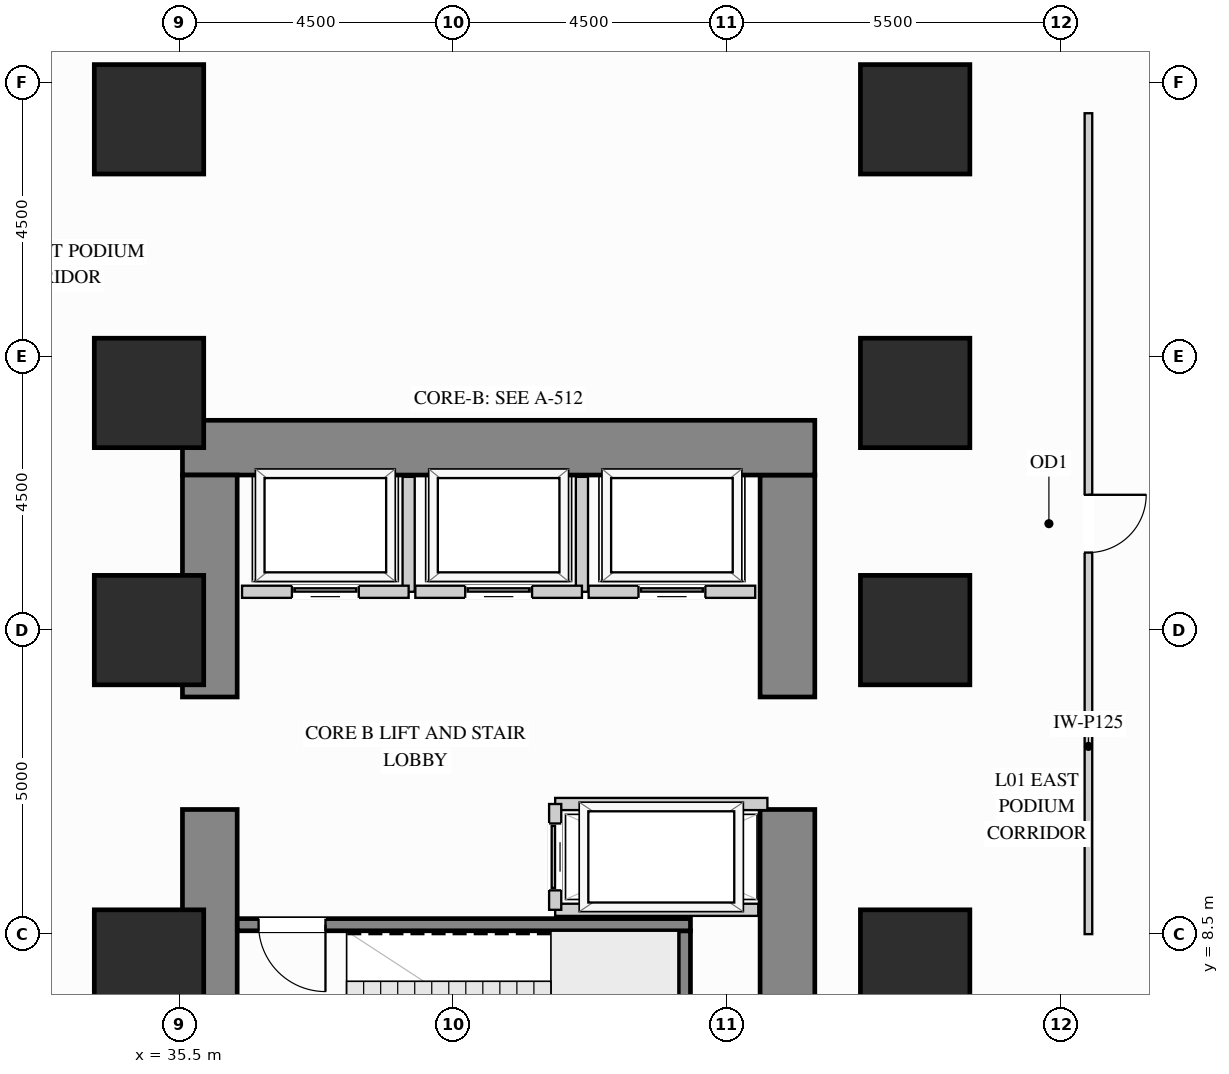
"""IFC4 building model, lengths in metres.
Left out: names, types, materials, properties, quantities, classifications, styles, units other than length and angle.
Written with IfcOpenShell. Run it as: python <this file> out.ifc"""

import sys

from ifc_helpers import new_model, si_unit, direction, frame, frame_2d, origin, origin_2d, place, context, subcontext, project, spatial, rectangle, extrude, source, transform, mapped, element, fill, save


model = new_model("IFC4")
c1 = context("Model", 3, precision=1e-05, world=origin(), true_north=direction((0.0, 1.0)))
c2 = subcontext(c1, "Body", "Model", "MODEL_VIEW")
j1 = project(units=[si_unit("LENGTHUNIT", "METRE"), si_unit("PLANEANGLEUNIT", "RADIAN")], contexts=[c1])
p1 = place(None, origin())
s1 = spatial("IfcSite", under=j1, at=p1, CompositionType="ELEMENT")
p2 = place(p1, origin())
s2 = spatial("IfcBuilding", under=s1, at=p2, CompositionType="ELEMENT")
p3 = place(p2, frame((0.0, 0.0, 4.5)))
s3 = spatial("IfcBuildingStorey", under=s2, at=p3, CompositionType="ELEMENT", Elevation=4.5)
m1 = source(origin(), c2, "Body", "SweptSolid", [
    extrude(rectangle(XDim=1.8, YDim=1.8, at=origin_2d()), origin(), (0.0, 0.0, 1.0), 4.25),
])
for number, where, z_axis, x_axis in (
    (1, (47.6, 8.0, 0.0), (0.0, 0.0, 1.0), (1.0, 0.0, 0.0)),
    (2, (47.6, 13.5, 0.0), (0.0, 0.0, 1.0), (1.0, 0.0, 0.0)),
    (3, (47.6, 17.4, 0.0), (0.0, 0.0, 1.0), (1.0, 0.0, 0.0)),
    (4, (47.6, 21.9, 0.0), (0.0, 0.0, 1.0), (1.0, 0.0, 0.0)),
    (5, (35.0, 8.0, 0.0), (0.0, 0.0, 1.0), (1.0, 0.0, 0.0)),
    (6, (35.0, 13.5, 0.0), (0.0, 0.0, 1.0), (1.0, 0.0, 0.0)),
    (7, (35.0, 17.4, 0.0), (0.0, 0.0, 1.0), (1.0, 0.0, 0.0)),
    (8, (35.0, 21.9, 0.0), (0.0, 0.0, 1.0), (1.0, 0.0, 0.0)),
):
    element("IfcColumn", number, at=place(p3, frame(where, z_axis=z_axis, x_axis=x_axis)), inside=s3, PredefinedType="COLUMN", context=c2, shape_type="MappedRepresentation", body=[
        mapped(m1, transform((0.0, 0.0, 0.0), x_axis=(1.0, 0.0, 0.0), y_axis=(0.0, 1.0, 0.0), z_axis=(0.0, 0.0, 1.0))),
    ])
m2 = source(origin(), c2, "Body", "SweptSolid", [
    extrude(rectangle(XDim=5.6, YDim=0.9, at=frame_2d((2.8, 0.0))), origin(), (0.0, 0.0, 1.0), 4.25),
])
p4 = place(p3, frame((45.5, 4.95, 0.0), z_axis=(0.0, 0.0, 1.0), x_axis=(0.0, 1.0, 0.0)))
e9 = element("IfcWall", 9, at=p4, inside=s3, PredefinedType="SHEAR", context=c2, shape_type="MappedRepresentation", body=[
    mapped(m2, transform((0.0, 0.0, 0.0), x_axis=(1.0, 0.0, 0.0), y_axis=(0.0, 1.0, 0.0), z_axis=(0.0, 0.0, 1.0))),
])
m3 = source(origin(), c2, "Body", "SweptSolid", [
    extrude(rectangle(XDim=3.65, YDim=0.9, at=frame_2d((1.825, 0.0))), origin(), (0.0, 0.0, 1.0), 4.25),
])
p5 = place(p3, frame((45.5, 12.4, 0.0), z_axis=(0.0, 0.0, 1.0), x_axis=(0.0, 1.0, 0.0)))
e10 = element("IfcWall", 10, at=p5, inside=s3, PredefinedType="SHEAR", context=c2, shape_type="MappedRepresentation", body=[
    mapped(m3, transform((0.0, 0.0, 0.0), x_axis=(1.0, 0.0, 0.0), y_axis=(0.0, 1.0, 0.0), z_axis=(0.0, 0.0, 1.0))),
])
m4 = source(origin(), c2, "Body", "SweptSolid", [
    extrude(rectangle(XDim=10.4, YDim=0.9, at=frame_2d((5.2, 0.0))), origin(), (0.0, 0.0, 1.0), 4.25),
])
p6 = place(p3, frame((35.55, 16.5, 0.0), z_axis=(0.0, 0.0, 1.0), x_axis=(1.0, 0.0, 0.0)))
e11 = element("IfcWall", 11, at=p6, inside=s3, PredefinedType="SHEAR", context=c2, shape_type="MappedRepresentation", body=[
    mapped(m4, transform((0.0, 0.0, 0.0), x_axis=(1.0, 0.0, 0.0), y_axis=(0.0, 1.0, 0.0), z_axis=(0.0, 0.0, 1.0))),
])
p7 = place(p3, frame((36.0, 4.95, 0.0), z_axis=(0.0, 0.0, 1.0), x_axis=(0.0, 1.0, 0.0)))
e12 = element("IfcWall", 12, at=p7, inside=s3, PredefinedType="SHEAR", context=c2, shape_type="MappedRepresentation", body=[
    mapped(m2, transform((0.0, 0.0, 0.0), x_axis=(1.0, 0.0, 0.0), y_axis=(0.0, 1.0, 0.0), z_axis=(0.0, 0.0, 1.0))),
])
p8 = place(p3, frame((36.0, 12.4, 0.0), z_axis=(0.0, 0.0, 1.0), x_axis=(0.0, 1.0, 0.0)))
e13 = element("IfcWall", 13, at=p8, inside=s3, PredefinedType="SHEAR", context=c2, shape_type="MappedRepresentation", body=[
    mapped(m3, transform((0.0, 0.0, 0.0), x_axis=(1.0, 0.0, 0.0), y_axis=(0.0, 1.0, 0.0), z_axis=(0.0, 0.0, 1.0))),
])
p9 = place(p3, frame((50.45, 8.5, 0.0), z_axis=(0.0, 0.0, 1.0), x_axis=(0.0, 1.0, 0.0)))
e14 = element("IfcWall", 14, at=p9, inside=s3, PredefinedType="PARTITIONING", context=c2, shape_type="SweptSolid", body=[
    extrude(rectangle(XDim=13.5, YDim=0.125, at=frame_2d((6.75, 0.0))), origin(), (0.0, 0.0, 1.0), 4.235),
])
p10 = place(p9, frame((6.275, 0.0, 0.0)))
e15 = element("IfcOpeningElement", 15, at=p10, cuts=e14, PredefinedType="OPENING", context=c2, shape_type="SweptSolid", body=[
    extrude(rectangle(XDim=0.95, YDim=2.15, at=frame_2d((0.475, 1.075))), frame((0.0, 0.073, 0.0), z_axis=(0.0, -1.0, 0.0), x_axis=(1.0, 0.0, 0.0)), (0.0, 0.0, 1.0), 0.145),
])
m5 = source(origin(), c2, "Body", "SweptSolid", [
    extrude(rectangle(XDim=1.89, YDim=0.2, at=frame_2d((0.945, 0.0))), origin(), (0.0, 0.0, 1.0), 4.235),
])
p11 = place(p3, frame((39.27, 14.13, 0.0), z_axis=(0.0, 0.0, 1.0), x_axis=(0.0, 1.0, 0.0)))
e16 = element("IfcWall", 16, at=p11, inside=s3, PredefinedType="PARTITIONING", context=c2, shape_type="MappedRepresentation", body=[
    mapped(m5, transform((0.0, 0.0, 0.0), x_axis=(1.0, 0.0, 0.0), y_axis=(0.0, 1.0, 0.0), z_axis=(0.0, 0.0, 1.0))),
])
p12 = place(p3, frame((36.53, 14.13, 0.0), z_axis=(0.0, 0.0, 1.0), x_axis=(1.0, 0.0, 0.0)))
e17 = element("IfcWall", 17, at=p12, inside=s3, PredefinedType="PARTITIONING", context=c2, shape_type="SweptSolid", body=[
    extrude(rectangle(XDim=2.74, YDim=0.2, at=frame_2d((1.37, 0.0))), origin(), (0.0, 0.0, 1.0), 4.235),
])
p13 = place(p12, frame((0.82, 0.0, 0.0)))
e18 = element("IfcOpeningElement", 18, at=p13, cuts=e17, PredefinedType="OPENING", context=c2, shape_type="SweptSolid", body=[
    extrude(rectangle(XDim=1.1, YDim=2.2, at=frame_2d((0.55, 1.1))), frame((0.0, 0.11, 0.0), z_axis=(0.0, -1.0, 0.0), x_axis=(1.0, 0.0, 0.0)), (0.0, 0.0, 1.0), 0.22),
])
p14 = place(p3, frame((42.12, 14.13, 0.0), z_axis=(0.0, 0.0, 1.0), x_axis=(0.0, 1.0, 0.0)))
e19 = element("IfcWall", 19, at=p14, inside=s3, PredefinedType="PARTITIONING", context=c2, shape_type="MappedRepresentation", body=[
    mapped(m5, transform((0.0, 0.0, 0.0), x_axis=(1.0, 0.0, 0.0), y_axis=(0.0, 1.0, 0.0), z_axis=(0.0, 0.0, 1.0))),
])
p15 = place(p3, frame((39.38, 14.13, 0.0), z_axis=(0.0, 0.0, 1.0), x_axis=(1.0, 0.0, 0.0)))
e20 = element("IfcWall", 20, at=p15, inside=s3, PredefinedType="PARTITIONING", context=c2, shape_type="SweptSolid", body=[
    extrude(rectangle(XDim=2.74, YDim=0.2, at=frame_2d((1.37, 0.0))), origin(), (0.0, 0.0, 1.0), 4.235),
])
p16 = place(p15, frame((0.82, 0.0, 0.0)))
e21 = element("IfcOpeningElement", 21, at=p16, cuts=e20, PredefinedType="OPENING", context=c2, shape_type="SweptSolid", body=[
    extrude(rectangle(XDim=1.1, YDim=2.2, at=frame_2d((0.55, 1.1))), frame((0.0, 0.11, 0.0), z_axis=(0.0, -1.0, 0.0), x_axis=(1.0, 0.0, 0.0)), (0.0, 0.0, 1.0), 0.22),
])
p17 = place(p3, frame((42.23, 14.13, 0.0), z_axis=(0.0, 0.0, 1.0), x_axis=(1.0, 0.0, 0.0)))
e22 = element("IfcWall", 22, at=p17, inside=s3, PredefinedType="PARTITIONING", context=c2, shape_type="SweptSolid", body=[
    extrude(rectangle(XDim=2.74, YDim=0.2, at=frame_2d((1.37, 0.0))), origin(), (0.0, 0.0, 1.0), 4.235),
])
p18 = place(p17, frame((0.82, 0.0, 0.0)))
e23 = element("IfcOpeningElement", 23, at=p18, cuts=e22, PredefinedType="OPENING", context=c2, shape_type="SweptSolid", body=[
    extrude(rectangle(XDim=1.1, YDim=2.2, at=frame_2d((0.55, 1.1))), frame((0.0, 0.11, 0.0), z_axis=(0.0, -1.0, 0.0), x_axis=(1.0, 0.0, 0.0)), (0.0, 0.0, 1.0), 0.22),
])
m6 = source(origin(), c2, "Body", "SweptSolid", [
    extrude(rectangle(XDim=3.49, YDim=0.2, at=frame_2d((1.745, 0.0))), origin(), (0.0, 0.0, 1.0), 4.235),
])
p19 = place(p3, frame((41.68, 10.64, 0.0), z_axis=(0.0, 0.0, 1.0), x_axis=(1.0, 0.0, 0.0)))
e24 = element("IfcWall", 24, at=p19, inside=s3, PredefinedType="PARTITIONING", context=c2, shape_type="MappedRepresentation", body=[
    mapped(m6, transform((0.0, 0.0, 0.0), x_axis=(1.0, 0.0, 0.0), y_axis=(0.0, 1.0, 0.0), z_axis=(0.0, 0.0, 1.0))),
])
m7 = source(origin(), c2, "Body", "SweptSolid", [
    extrude(rectangle(XDim=3.34, YDim=0.2, at=frame_2d((1.67, 0.0))), origin(), (0.0, 0.0, 1.0), 4.235),
])
p20 = place(p3, frame((41.68, 8.9, 0.0), z_axis=(0.0, 0.0, 1.0), x_axis=(1.0, 0.0, 0.0)))
e25 = element("IfcWall", 25, at=p20, inside=s3, PredefinedType="PARTITIONING", context=c2, shape_type="MappedRepresentation", body=[
    mapped(m7, transform((0.0, 0.0, 0.0), x_axis=(1.0, 0.0, 0.0), y_axis=(0.0, 1.0, 0.0), z_axis=(0.0, 0.0, 1.0))),
])
p21 = place(p3, frame((41.68, 8.9, 0.0), z_axis=(0.0, 0.0, 1.0), x_axis=(0.0, 1.0, 0.0)))
e26 = element("IfcWall", 26, at=p21, inside=s3, PredefinedType="PARTITIONING", context=c2, shape_type="SweptSolid", body=[
    extrude(rectangle(XDim=1.74, YDim=0.2, at=frame_2d((0.87, 0.0))), origin(), (0.0, 0.0, 1.0), 4.235),
])
p22 = place(p21, frame((0.32, 0.0, 0.0)))
e27 = element("IfcOpeningElement", 27, at=p22, cuts=e26, PredefinedType="OPENING", context=c2, shape_type="SweptSolid", body=[
    extrude(rectangle(XDim=1.1, YDim=2.2, at=frame_2d((0.55, 1.1))), frame((0.0, 0.11, 0.0), z_axis=(0.0, -1.0, 0.0), x_axis=(1.0, 0.0, 0.0)), (0.0, 0.0, 1.0), 0.22),
])
m8 = source(origin(), c2, "Body", "SweptSolid", [
    extrude(rectangle(XDim=3.603, YDim=0.2, at=frame_2d((1.802, 0.0))), origin(), (0.0, 0.0, 1.0), 4.25),
])
p23 = place(p3, frame((43.805, 4.952, 0.0), z_axis=(0.0, 0.0, 1.0), x_axis=(0.0, 1.0, 0.0)))
e28 = element("IfcWall", 28, at=p23, inside=s3, PredefinedType="SHEAR", context=c2, shape_type="MappedRepresentation", body=[
    mapped(m8, transform((0.0, 0.0, 0.0), x_axis=(1.0, 0.0, 0.0), y_axis=(0.0, 1.0, 0.0), z_axis=(0.0, 0.0, 1.0))),
])
p24 = place(p3, frame((36.452, 8.655, 0.0), z_axis=(0.0, 0.0, 1.0), x_axis=(1.0, 0.0, 0.0)))
e29 = element("IfcWall", 29, at=p24, inside=s3, PredefinedType="SHEAR", context=c2, shape_type="SweptSolid", body=[
    extrude(rectangle(XDim=7.453, YDim=0.2, at=frame_2d((3.727, 0.0))), origin(), (0.0, 0.0, 1.0), 4.25),
])
p25 = place(p24, frame((0.35, 0.0, 0.0)))
e30 = element("IfcOpeningElement", 30, at=p25, cuts=e29, PredefinedType="OPENING", context=c2, shape_type="SweptSolid", body=[
    extrude(rectangle(XDim=1.1, YDim=2.15, at=frame_2d((0.55, 1.075))), frame((0.0, 0.11, 0.0), z_axis=(0.0, -1.0, 0.0), x_axis=(1.0, 0.0, 0.0)), (0.0, 0.0, 1.0), 0.22),
])
m9 = source(origin(), c2, "Body", "SweptSolid", [
    extrude(rectangle(XDim=1.1, YDim=2.2, at=frame_2d((0.55, 1.1))), frame((0.0, 0.025, 0.0), z_axis=(0.0, -1.0, 0.0), x_axis=(1.0, 0.0, 0.0)), (0.0, 0.0, 1.0), 0.05),
])
p26 = place(p13, origin())
e31 = element("IfcDoor", 31, at=p26, inside=s3, OperationType="SLIDING_TO_LEFT", PredefinedType="DOOR", context=c2, shape_type="MappedRepresentation", body=[
    mapped(m9, transform((0.0, 0.0, 0.0), x_axis=(1.0, 0.0, 0.0), y_axis=(0.0, 1.0, 0.0), z_axis=(0.0, 0.0, 1.0))),
])
fill(e18, e31)
p27 = place(p16, origin())
e32 = element("IfcDoor", 32, at=p27, inside=s3, OperationType="SLIDING_TO_LEFT", PredefinedType="DOOR", context=c2, shape_type="MappedRepresentation", body=[
    mapped(m9, transform((0.0, 0.0, 0.0), x_axis=(1.0, 0.0, 0.0), y_axis=(0.0, 1.0, 0.0), z_axis=(0.0, 0.0, 1.0))),
])
fill(e21, e32)
p28 = place(p18, origin())
e33 = element("IfcDoor", 33, at=p28, inside=s3, OperationType="SLIDING_TO_LEFT", PredefinedType="DOOR", context=c2, shape_type="MappedRepresentation", body=[
    mapped(m9, transform((0.0, 0.0, 0.0), x_axis=(1.0, 0.0, 0.0), y_axis=(0.0, 1.0, 0.0), z_axis=(0.0, 0.0, 1.0))),
])
fill(e23, e33)
p29 = place(p22, origin())
e34 = element("IfcDoor", 34, at=p29, inside=s3, OperationType="SLIDING_TO_LEFT", PredefinedType="DOOR", context=c2, shape_type="MappedRepresentation", body=[
    mapped(m9, transform((0.0, 0.0, 0.0), x_axis=(1.0, 0.0, 0.0), y_axis=(0.0, 1.0, 0.0), z_axis=(0.0, 0.0, 1.0))),
])
fill(e27, e34)
m10 = source(origin(), c2, "Body", "SweptSolid", [
    extrude(rectangle(XDim=0.95, YDim=2.15, at=frame_2d((0.475, 1.075))), frame((0.0, 0.025, 0.0), z_axis=(0.0, -1.0, 0.0), x_axis=(1.0, 0.0, 0.0)), (0.0, 0.0, 1.0), 0.05),
])
p30 = place(p10, origin())
e35 = element("IfcDoor", 35, at=p30, inside=s3, OperationType="SINGLE_SWING_RIGHT", PredefinedType="DOOR", context=c2, shape_type="MappedRepresentation", body=[
    mapped(m10, transform((0.0, 0.0, 0.0), x_axis=(1.0, 0.0, 0.0), y_axis=(0.0, 1.0, 0.0), z_axis=(0.0, 0.0, 1.0))),
])
fill(e15, e35)
m11 = source(origin(), c2, "Body", "SweptSolid", [
    extrude(rectangle(XDim=1.1, YDim=2.15, at=frame_2d((0.55, 1.075))), frame((0.0, 0.025, 0.0), z_axis=(0.0, -1.0, 0.0), x_axis=(1.0, 0.0, 0.0)), (0.0, 0.0, 1.0), 0.05),
])
p31 = place(p25, origin())
e36 = element("IfcDoor", 36, at=p31, inside=s3, OperationType="SINGLE_SWING_RIGHT", PredefinedType="DOOR", context=c2, shape_type="MappedRepresentation", body=[
    mapped(m11, transform((0.0, 0.0, 0.0), x_axis=(1.0, 0.0, 0.0), y_axis=(0.0, 1.0, 0.0), z_axis=(0.0, 0.0, 1.0))),
])
fill(e30, e36)
save(model, sys.argv[1])
